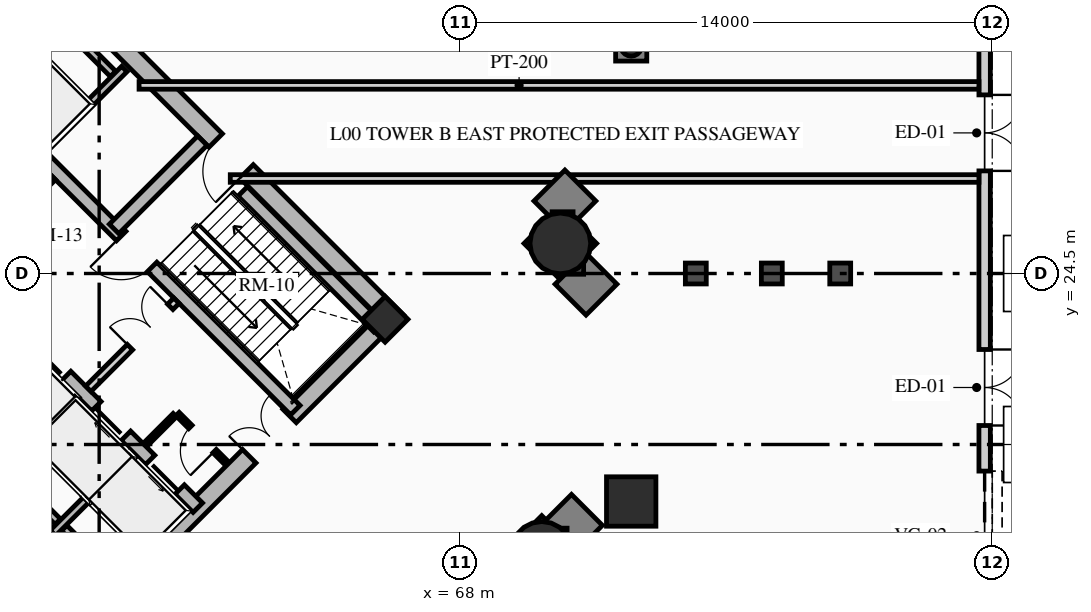
"""IFC4 building model, lengths in metres.
Left out: names, types, materials, properties, quantities, classifications, styles, units other than length and angle.
Written with IfcOpenShell. Run it as: python <this file> out.ifc"""

import sys

from ifc_helpers import new_model, si_unit, direction, frame, frame_2d, origin, origin_2d, place, context, subcontext, project, spatial, rectangle, circle, hollow_circle, extrude, source, transform, mapped, element, fill, save


model = new_model("IFC4")
c1 = context("Model", 3, precision=1e-05, world=origin(), true_north=direction((0.0, 1.0)))
c2 = subcontext(c1, "Body", "Model", "MODEL_VIEW")
j1 = project(units=[si_unit("LENGTHUNIT", "METRE"), si_unit("PLANEANGLEUNIT", "RADIAN")], contexts=[c1])
p1 = place(None, origin())
s1 = spatial("IfcSite", under=j1, at=p1, CompositionType="ELEMENT")
p2 = place(p1, origin())
s2 = spatial("IfcBuilding", under=s1, at=p2, CompositionType="ELEMENT")
p3 = place(p2, origin())
s3 = spatial("IfcBuildingStorey", under=s2, at=p3, CompositionType="ELEMENT", Elevation=0.0)
p4 = place(p3, frame((58.773, 15.661, 0.0), z_axis=(0.0, 0.0, 1.0), x_axis=(-0.707106781187, 0.707106781187, 0.0)))
e1 = element("IfcWall", 1, at=p4, inside=s3, PredefinedType="SHEAR", context=c2, shape_type="SweptSolid", body=[
    extrude(rectangle(XDim=14.3, YDim=0.5, at=frame_2d((7.15, 0.0))), origin(), (0.0, 0.0, 1.0), 4.8),
])
p5 = place(p3, frame((66.339, 23.227, 0.0), z_axis=(0.0, 0.0, 1.0), x_axis=(-0.707106781187, 0.707106781187, 0.0)))
e2 = element("IfcWall", 2, at=p5, inside=s3, PredefinedType="SHEAR", context=c2, shape_type="SweptSolid", body=[
    extrude(rectangle(XDim=14.3, YDim=0.5, at=frame_2d((7.15, 0.0))), origin(), (0.0, 0.0, 1.0), 4.8),
])
m1 = source(origin(), c2, "Body", "SweptSolid", [
    extrude(rectangle(XDim=1.15, YDim=2.02, at=frame_2d((0.575, 1.01))), frame((0.0, 0.26, 0.0), z_axis=(0.0, -1.0, 0.0), x_axis=(1.0, 0.0, 0.0)), (0.0, 0.0, 1.0), 0.52),
])
p6 = place(p5, frame((5.6, 0.0, 0.0)))
e3 = element("IfcOpeningElement", 3, at=p6, cuts=e2, PredefinedType="OPENING", context=c2, shape_type="MappedRepresentation", body=[
    mapped(m1, transform((0.0, 0.0, 0.0), x_axis=(1.0, 0.0, 0.0), y_axis=(0.0, 1.0, 0.0), z_axis=(0.0, 0.0, 1.0), scale=1.0)),
])
p7 = place(p3, frame((58.596, 15.838, 0.0), z_axis=(0.0, 0.0, 1.0), x_axis=(0.707106781187, 0.707106781187, 0.0)))
e4 = element("IfcWall", 4, at=p7, inside=s3, PredefinedType="SHEAR", context=c2, shape_type="SweptSolid", body=[
    extrude(rectangle(XDim=10.7, YDim=0.5, at=frame_2d((5.35, 0.0))), origin(), (0.0, 0.0, 1.0), 4.8),
])
m2 = source(origin(), c2, "Body", "SweptSolid", [
    extrude(rectangle(XDim=1.5, YDim=2.02, at=frame_2d((0.75, 1.01))), frame((0.0, 0.26, 0.0), z_axis=(0.0, -1.0, 0.0), x_axis=(1.0, 0.0, 0.0)), (0.0, 0.0, 1.0), 0.52),
])
p8 = place(p7, frame((5.45, 0.0, 0.0)))
e5 = element("IfcOpeningElement", 5, at=p8, cuts=e4, PredefinedType="OPENING", context=c2, shape_type="MappedRepresentation", body=[
    mapped(m2, transform((0.0, 0.0, 0.0), x_axis=(1.0, 0.0, 0.0), y_axis=(0.0, 1.0, 0.0), z_axis=(0.0, 0.0, 1.0), scale=1.0)),
])
p9 = place(p3, frame((61.096, 18.338, 0.0), z_axis=(0.0, 0.0, 1.0), x_axis=(-0.707106781187, 0.707106781187, 0.0)))
e6 = element("IfcWall", 6, at=p9, inside=s3, PredefinedType="SHEAR", context=c2, shape_type="SweptSolid", body=[
    extrude(rectangle(XDim=13.8, YDim=0.35, at=frame_2d((6.9, 0.0))), origin(), (0.0, 0.0, 1.0), 4.8),
])
m3 = source(origin(), c2, "Body", "SweptSolid", [
    extrude(rectangle(XDim=1.1, YDim=2.015, at=frame_2d((0.55, 1.007))), frame((0.0, 0.185, 0.0), z_axis=(0.0, -1.0, 0.0), x_axis=(1.0, 0.0, 0.0)), (0.0, 0.0, 1.0), 0.37),
])
p10 = place(p9, frame((4.9, 0.0, 0.0)))
e7 = element("IfcOpeningElement", 7, at=p10, cuts=e6, PredefinedType="OPENING", context=c2, shape_type="MappedRepresentation", body=[
    mapped(m3, transform((0.0, 0.0, 0.0), x_axis=(1.0, 0.0, 0.0), y_axis=(0.0, 1.0, 0.0), z_axis=(0.0, 0.0, 1.0), scale=1.0)),
])
p11 = place(p9, frame((0.675, 0.0, 0.0)))
e8 = element("IfcOpeningElement", 8, at=p11, cuts=e6, PredefinedType="OPENING", context=c2, shape_type="MappedRepresentation", body=[
    mapped(m3, transform((0.0, 0.0, 0.0), x_axis=(1.0, 0.0, 0.0), y_axis=(0.0, 1.0, 0.0), z_axis=(0.0, 0.0, 1.0), scale=1.0)),
])
p12 = place(p9, frame((2.675, 0.0, 0.0)))
e9 = element("IfcOpeningElement", 9, at=p12, cuts=e6, PredefinedType="OPENING", context=c2, shape_type="MappedRepresentation", body=[
    mapped(m3, transform((0.0, 0.0, 0.0), x_axis=(1.0, 0.0, 0.0), y_axis=(0.0, 1.0, 0.0), z_axis=(0.0, 0.0, 1.0), scale=1.0)),
])
m4 = source(origin(), c2, "Body", "SweptSolid", [
    extrude(rectangle(XDim=1.15, YDim=2.02, at=frame_2d((0.575, 1.01))), frame((0.0, 0.185, 0.0), z_axis=(0.0, -1.0, 0.0), x_axis=(1.0, 0.0, 0.0)), (0.0, 0.0, 1.0), 0.37),
])
p13 = place(p9, frame((7.32, 0.0, 0.0)))
e10 = element("IfcOpeningElement", 10, at=p13, cuts=e6, PredefinedType="OPENING", context=c2, shape_type="MappedRepresentation", body=[
    mapped(m4, transform((0.0, 0.0, 0.0), x_axis=(1.0, 0.0, 0.0), y_axis=(0.0, 1.0, 0.0), z_axis=(0.0, 0.0, 1.0), scale=1.0)),
])
p14 = place(p3, frame((63.662, 20.904, 0.0), z_axis=(0.0, 0.0, 1.0), x_axis=(-0.707106781187, 0.707106781187, 0.0)))
e11 = element("IfcWall", 11, at=p14, inside=s3, PredefinedType="SHEAR", context=c2, shape_type="SweptSolid", body=[
    extrude(rectangle(XDim=13.8, YDim=0.35, at=frame_2d((6.9, 0.0))), origin(), (0.0, 0.0, 1.0), 4.8),
])
p15 = place(p14, frame((10.025, 0.0, 0.0)))
e12 = element("IfcOpeningElement", 12, at=p15, cuts=e11, PredefinedType="OPENING", context=c2, shape_type="MappedRepresentation", body=[
    mapped(m3, transform((0.0, 0.0, 0.0), x_axis=(1.0, 0.0, 0.0), y_axis=(0.0, 1.0, 0.0), z_axis=(0.0, 0.0, 1.0), scale=1.0)),
])
p16 = place(p14, frame((12.025, 0.0, 0.0)))
e13 = element("IfcOpeningElement", 13, at=p16, cuts=e11, PredefinedType="OPENING", context=c2, shape_type="MappedRepresentation", body=[
    mapped(m3, transform((0.0, 0.0, 0.0), x_axis=(1.0, 0.0, 0.0), y_axis=(0.0, 1.0, 0.0), z_axis=(0.0, 0.0, 1.0), scale=1.0)),
])
p17 = place(p14, frame((5.33, 0.0, 0.0)))
e14 = element("IfcOpeningElement", 14, at=p17, cuts=e11, PredefinedType="OPENING", context=c2, shape_type="MappedRepresentation", body=[
    mapped(m4, transform((0.0, 0.0, 0.0), x_axis=(1.0, 0.0, 0.0), y_axis=(0.0, 1.0, 0.0), z_axis=(0.0, 0.0, 1.0), scale=1.0)),
])
p18 = place(p3, frame((65.847, 23.089, 0.0), z_axis=(0.0, 0.0, 1.0), x_axis=(-0.707106781187, 0.707106781187, 0.0)))
e15 = element("IfcWall", 15, at=p18, inside=s3, PredefinedType="SHEAR", context=c2, shape_type="SweptSolid", body=[
    extrude(rectangle(XDim=5.05, YDim=0.35, at=frame_2d((2.525, 0.0))), origin(), (0.0, 0.0, 1.0), 4.8),
])
p19 = place(p3, frame((58.893, 25.674, 0.0), z_axis=(0.0, 0.0, 1.0), x_axis=(0.707106781187, 0.707106781187, 0.0)))
e16 = element("IfcWall", 16, at=p19, inside=s3, PredefinedType="SHEAR", context=c2, shape_type="SweptSolid", body=[
    extrude(rectangle(XDim=3.285, YDim=0.35, at=frame_2d((1.643, 0.0))), origin(), (0.0, 0.0, 1.0), 4.8),
])
p20 = place(p3, frame((66.024, 23.294, 0.0), z_axis=(0.0, 0.0, 1.0), x_axis=(0.707106781187, 0.707106781187, 0.0)))
e17 = element("IfcColumn", 17, at=p20, inside=s3, PredefinedType="COLUMN", context=c2, shape_type="SweptSolid", body=[
    extrude(rectangle(XDim=0.85, YDim=0.85, at=origin_2d()), origin(), (0.0, 0.0, 1.0), 4.8),
])
for number, where, z_axis, x_axis in (
    (18, (70.146, 17.173, 0.0), (0.0, 0.0, 1.0), (1.0, 0.0, 0.0)),
    (19, (70.635, 25.291, 0.0), (0.0, 0.0, 1.0), (1.0, 0.0, 0.0)),
):
    element("IfcColumn", number, at=place(p3, frame(where, z_axis=z_axis, x_axis=x_axis)), inside=s3, PredefinedType="USERDEFINED", context=c2, shape_type="SweptSolid", body=[
        extrude(circle(Radius=0.8, at=origin_2d()), origin(), (0.0, 0.0, 1.0), 4.8),
    ])
p21 = place(p3, frame((72.5, 18.5, 0.0), z_axis=(0.0, 0.0, 1.0), x_axis=(1.0, 0.0, 0.0)))
e20 = element("IfcColumn", 20, at=p21, inside=s3, PredefinedType="COLUMN", context=c2, shape_type="SweptSolid", body=[
    extrude(rectangle(XDim=1.3, YDim=1.3, at=origin_2d()), origin(), (0.0, 0.0, 1.0), 4.8),
])
p22 = place(p3, frame((72.5, 30.5, 0.0), z_axis=(0.0, 0.0, 1.0), x_axis=(1.0, 0.0, 0.0)))
e21 = element("IfcColumn", 21, at=p22, inside=s3, PredefinedType="COLUMN", context=c2, shape_type="SweptSolid", body=[
    extrude(hollow_circle(Radius=0.28, WallThickness=0.02, at=origin_2d()), origin(), (0.0, 0.0, 1.0), 4.8),
])
p23 = place(p3, frame((81.8, 44.5, 0.0), z_axis=(0.0, 0.0, 1.0), x_axis=(0.0, -1.0, 0.0)))
e22 = element("IfcWall", 22, at=p23, inside=s3, PredefinedType="SOLIDWALL", context=c2, shape_type="SweptSolid", body=[
    extrude(rectangle(XDim=40.0, YDim=0.3, at=frame_2d((20.0, 0.0))), origin(), (0.0, 0.0, 1.0), 4.485),
])
m5 = source(origin(), c2, "Body", "SweptSolid", [
    extrude(rectangle(XDim=6.0, YDim=3.1, at=frame_2d((3.0, 1.55))), frame((0.0, 0.16, 0.0), z_axis=(0.0, -1.0, 0.0), x_axis=(1.0, 0.0, 0.0)), (0.0, 0.0, 1.0), 0.32),
])
p24 = place(p23, frame((33.6, 0.0, 0.0)))
e23 = element("IfcOpeningElement", 23, at=p24, cuts=e22, PredefinedType="OPENING", context=c2, shape_type="MappedRepresentation", body=[
    mapped(m5, transform((0.0, 0.0, 0.0), x_axis=(1.0, 0.0, 0.0), y_axis=(0.0, 1.0, 0.0), z_axis=(0.0, 0.0, 1.0), scale=1.0)),
])
m6 = source(origin(), c2, "Body", "SweptSolid", [
    extrude(rectangle(XDim=3.4, YDim=3.0, at=frame_2d((1.7, 1.5))), frame((0.0, 0.16, 0.0), z_axis=(0.0, -1.0, 0.0), x_axis=(1.0, 0.0, 0.0)), (0.0, 0.0, 1.0), 0.32),
])
p25 = place(p23, frame((25.2, 0.0, 0.0)))
e24 = element("IfcOpeningElement", 24, at=p25, cuts=e22, PredefinedType="OPENING", context=c2, shape_type="MappedRepresentation", body=[
    mapped(m6, transform((0.0, 0.0, 0.0), x_axis=(1.0, 0.0, 0.0), y_axis=(0.0, 1.0, 0.0), z_axis=(0.0, 0.0, 1.0), scale=1.0)),
])
p26 = place(p23, frame((29.2, 0.0, 0.0)))
e25 = element("IfcOpeningElement", 25, at=p26, cuts=e22, PredefinedType="OPENING", context=c2, shape_type="MappedRepresentation", body=[
    mapped(m6, transform((0.0, 0.0, 0.0), x_axis=(1.0, 0.0, 0.0), y_axis=(0.0, 1.0, 0.0), z_axis=(0.0, 0.0, 1.0), scale=1.0)),
])
m7 = source(origin(), c2, "Body", "SweptSolid", [
    extrude(rectangle(XDim=2.0, YDim=2.25, at=frame_2d((1.0, 1.125))), frame((0.0, 0.16, 0.0), z_axis=(0.0, -1.0, 0.0), x_axis=(1.0, 0.0, 0.0)), (0.0, 0.0, 1.0), 0.32),
])
p27 = place(p23, frame((6.0, 0.0, 0.0)))
e26 = element("IfcOpeningElement", 26, at=p27, cuts=e22, PredefinedType="OPENING", context=c2, shape_type="MappedRepresentation", body=[
    mapped(m7, transform((0.0, 0.0, 0.0), x_axis=(1.0, 0.0, 0.0), y_axis=(0.0, 1.0, 0.0), z_axis=(0.0, 0.0, 1.0), scale=1.0)),
])
p28 = place(p23, frame((15.3, 0.0, 0.0)))
e27 = element("IfcOpeningElement", 27, at=p28, cuts=e22, PredefinedType="OPENING", context=c2, shape_type="MappedRepresentation", body=[
    mapped(m7, transform((0.0, 0.0, 0.0), x_axis=(1.0, 0.0, 0.0), y_axis=(0.0, 1.0, 0.0), z_axis=(0.0, 0.0, 1.0), scale=1.0)),
])
p29 = place(p23, frame((22.0, 0.0, 0.0)))
e28 = element("IfcOpeningElement", 28, at=p29, cuts=e22, PredefinedType="OPENING", context=c2, shape_type="MappedRepresentation", body=[
    mapped(m7, transform((0.0, 0.0, 0.0), x_axis=(1.0, 0.0, 0.0), y_axis=(0.0, 1.0, 0.0), z_axis=(0.0, 0.0, 1.0), scale=1.0)),
])
p30 = place(p3, frame((55.888, 19.069, 0.0), z_axis=(0.0, 0.0, 1.0), x_axis=(0.707106781187, 0.707106781187, 0.0)))
e29 = element("IfcWall", 29, at=p30, inside=s3, PredefinedType="SHEAR", context=c2, shape_type="SweptSolid", body=[
    extrude(rectangle(XDim=2.97, YDim=0.2, at=frame_2d((1.485, 0.0))), origin(), (0.0, 0.0, 1.0), 4.8),
])
p31 = place(p3, frame((57.284, 17.673, 0.0), z_axis=(0.0, 0.0, 1.0), x_axis=(0.707147878904, 0.70706568108, 0.0)))
e30 = element("IfcWall", 30, at=p31, inside=s3, PredefinedType="SHEAR", context=c2, shape_type="SweptSolid", body=[
    extrude(rectangle(XDim=2.97, YDim=0.2, at=frame_2d((1.485, 0.0))), origin(), (0.0, 0.0, 1.0), 4.8),
])
p32 = place(p3, frame((57.412, 17.97, 0.0), z_axis=(0.0, 0.0, 1.0), x_axis=(-0.707106781187, 0.707106781187, 0.0)))
e31 = element("IfcWall", 31, at=p32, inside=s3, PredefinedType="SHEAR", context=c2, shape_type="SweptSolid", body=[
    extrude(rectangle(XDim=1.735, YDim=0.2, at=frame_2d((0.867, 0.0))), origin(), (0.0, 0.0, 1.0), 4.8),
])
p33 = place(p3, frame((58.737, 16.644, 0.0), z_axis=(0.0, 0.0, 1.0), x_axis=(-0.707032117043, 0.707181437447, 0.0)))
e32 = element("IfcWall", 32, at=p33, inside=s3, PredefinedType="SHEAR", context=c2, shape_type="SweptSolid", body=[
    extrude(rectangle(XDim=1.635, YDim=0.2, at=frame_2d((0.817, 0.0))), origin(), (0.0, 0.0, 1.0), 4.8),
])
p34 = place(p3, frame((57.062, 27.781, 0.0), z_axis=(0.0, 0.0, 1.0), x_axis=(0.707106781187, 0.707106781187, 0.0)))
e33 = element("IfcWall", 33, at=p34, inside=s3, PredefinedType="SHEAR", context=c2, shape_type="SweptSolid", body=[
    extrude(rectangle(XDim=2.97, YDim=0.2, at=frame_2d((1.485, 0.0))), origin(), (0.0, 0.0, 1.0), 4.8),
])
p35 = place(p3, frame((55.615, 29.227, 0.0), z_axis=(0.0, 0.0, 1.0), x_axis=(0.707147878904, 0.70706568108, 0.0)))
e34 = element("IfcWall", 34, at=p35, inside=s3, PredefinedType="SHEAR", context=c2, shape_type="SweptSolid", body=[
    extrude(rectangle(XDim=2.97, YDim=0.2, at=frame_2d((1.485, 0.0))), origin(), (0.0, 0.0, 1.0), 4.8),
])
p36 = place(p3, frame((58.865, 29.754, 0.0), z_axis=(0.0, 0.0, 1.0), x_axis=(-0.707174411312, 0.707039144592, 0.0)))
e35 = element("IfcWall", 35, at=p36, inside=s3, PredefinedType="SHEAR", context=c2, shape_type="SweptSolid", body=[
    extrude(rectangle(XDim=1.805, YDim=0.2, at=frame_2d((0.902, 0.0))), origin(), (0.0, 0.0, 1.0), 4.8),
])
p37 = place(p3, frame((58.214, 21.467, 0.0), z_axis=(0.0, 0.0, 1.0), x_axis=(0.707106781187, 0.707106781187, 0.0)))
e36 = element("IfcWall", 36, at=p37, inside=s3, PredefinedType="PARTITIONING", context=c2, shape_type="SweptSolid", body=[
    extrude(rectangle(XDim=3.28, YDim=0.2, at=frame_2d((1.64, 0.0))), origin(), (0.0, 0.0, 1.0), 4.485),
])
m8 = source(origin(), c2, "Body", "SweptSolid", [
    extrude(rectangle(XDim=1.5, YDim=2.02, at=frame_2d((0.75, 1.01))), frame((0.0, 0.11, 0.0), z_axis=(0.0, -1.0, 0.0), x_axis=(1.0, 0.0, 0.0)), (0.0, 0.0, 1.0), 0.22),
])
p38 = place(p37, frame((1.55, 0.0, 0.0)))
e37 = element("IfcOpeningElement", 37, at=p38, cuts=e36, PredefinedType="OPENING", context=c2, shape_type="MappedRepresentation", body=[
    mapped(m8, transform((0.0, 0.0, 0.0), x_axis=(1.0, 0.0, 0.0), y_axis=(0.0, 1.0, 0.0), z_axis=(0.0, 0.0, 1.0), scale=1.0)),
])
p39 = place(p3, frame((54.961, 24.719, 0.0), z_axis=(0.0, 0.0, 1.0), x_axis=(0.707106781187, 0.707106781187, 0.0)))
e38 = element("IfcWall", 38, at=p39, inside=s3, PredefinedType="PARTITIONING", context=c2, shape_type="SweptSolid", body=[
    extrude(rectangle(XDim=3.28, YDim=0.2, at=frame_2d((1.64, 0.0))), origin(), (0.0, 0.0, 1.0), 4.485),
])
m9 = source(origin(), c2, "Body", "SweptSolid", [
    extrude(rectangle(XDim=0.9, YDim=2.005, at=frame_2d((0.45, 1.002))), frame((0.0, 0.11, 0.0), z_axis=(0.0, -1.0, 0.0), x_axis=(1.0, 0.0, 0.0)), (0.0, 0.0, 1.0), 0.22),
])
p40 = place(p39, frame((0.16, 0.0, 0.0)))
e39 = element("IfcOpeningElement", 39, at=p40, cuts=e38, PredefinedType="OPENING", context=c2, shape_type="MappedRepresentation", body=[
    mapped(m9, transform((0.0, 0.0, 0.0), x_axis=(1.0, 0.0, 0.0), y_axis=(0.0, 1.0, 0.0), z_axis=(0.0, 0.0, 1.0), scale=1.0)),
])
p41 = place(p3, frame((61.835, 19.529, 0.0), z_axis=(0.0, 0.0, 1.0), x_axis=(-0.707174592913, 0.707038962956, 0.0)))
e40 = element("IfcWall", 40, at=p41, inside=s3, PredefinedType="PARTITIONING", context=c2, shape_type="SweptSolid", body=[
    extrude(rectangle(XDim=1.8, YDim=0.125, at=frame_2d((0.9, 0.0))), origin(), (0.0, 0.0, 1.0), 4.485),
])
m10 = source(origin(), c2, "Body", "SweptSolid", [
    extrude(rectangle(XDim=0.9, YDim=2.005, at=frame_2d((0.45, 1.002))), frame((0.0, 0.073, 0.0), z_axis=(0.0, -1.0, 0.0), x_axis=(1.0, 0.0, 0.0)), (0.0, 0.0, 1.0), 0.145),
])
p42 = place(p41, frame((0.42, 0.0, 0.0)))
e41 = element("IfcOpeningElement", 41, at=p42, cuts=e40, PredefinedType="OPENING", context=c2, shape_type="MappedRepresentation", body=[
    mapped(m10, transform((0.0, 0.0, 0.0), x_axis=(1.0, 0.0, 0.0), y_axis=(0.0, 1.0, 0.0), z_axis=(0.0, 0.0, 1.0), scale=1.0)),
])
p43 = place(p3, frame((59.713, 19.996, 0.0), z_axis=(0.0, 0.0, 1.0), x_axis=(0.707217726, 0.706995818963, 0.0)))
e42 = element("IfcWall", 42, at=p43, inside=s3, PredefinedType="PARTITIONING", context=c2, shape_type="SweptSolid", body=[
    extrude(rectangle(XDim=1.1, YDim=0.125, at=frame_2d((0.55, 0.0))), origin(), (0.0, 0.0, 1.0), 4.485),
])
p44 = place(p3, frame((59.55, 29.45, 0.0), z_axis=(0.0, 0.0, 1.0), x_axis=(1.0, 0.0, 0.0)))
e43 = element("IfcWall", 43, at=p44, inside=s3, PredefinedType="PARTITIONING", context=c2, shape_type="SweptSolid", body=[
    extrude(rectangle(XDim=22.1, YDim=0.2, at=frame_2d((11.05, 0.0))), origin(), (0.0, 0.0, 1.0), 3.529),
])
p45 = place(p3, frame((61.95, 27.0, 0.0), z_axis=(0.0, 0.0, 1.0), x_axis=(1.0, 0.0, 0.0)))
e44 = element("IfcWall", 44, at=p45, inside=s3, PredefinedType="PARTITIONING", context=c2, shape_type="SweptSolid", body=[
    extrude(rectangle(XDim=19.7, YDim=0.2, at=frame_2d((9.85, 0.0))), origin(), (0.0, 0.0, 1.0), 3.529),
])
m11 = source(origin(), c2, "Body", "SweptSolid", [
    extrude(rectangle(XDim=3.4, YDim=3.0, at=frame_2d((1.7, 1.5))), frame((0.0, 0.025, 0.0), z_axis=(0.0, -1.0, 0.0), x_axis=(1.0, 0.0, 0.0)), (0.0, 0.0, 1.0), 0.05),
])
p46 = place(p25, origin())
e45 = element("IfcDoor", 45, at=p46, inside=s3, OperationType="ROLLINGUP", PredefinedType="GATE", context=c2, shape_type="MappedRepresentation", body=[
    mapped(m11, transform((0.0, 0.0, 0.0), x_axis=(1.0, 0.0, 0.0), y_axis=(0.0, 1.0, 0.0), z_axis=(0.0, 0.0, 1.0), scale=1.0)),
])
fill(e24, e45)
m12 = source(origin(), c2, "Body", "SweptSolid", [
    extrude(rectangle(XDim=2.0, YDim=2.25, at=frame_2d((1.0, 1.125))), frame((0.0, 0.025, 0.0), z_axis=(0.0, -1.0, 0.0), x_axis=(1.0, 0.0, 0.0)), (0.0, 0.0, 1.0), 0.05),
])
p47 = place(p28, origin())
e46 = element("IfcDoor", 46, at=p47, inside=s3, OperationType="DOUBLE_DOOR_SINGLE_SWING", PredefinedType="DOOR", context=c2, shape_type="MappedRepresentation", body=[
    mapped(m12, transform((0.0, 0.0, 0.0), x_axis=(1.0, 0.0, 0.0), y_axis=(0.0, 1.0, 0.0), z_axis=(0.0, 0.0, 1.0), scale=1.0)),
])
fill(e27, e46)
p48 = place(p29, origin())
e47 = element("IfcDoor", 47, at=p48, inside=s3, OperationType="DOUBLE_DOOR_SINGLE_SWING", PredefinedType="DOOR", context=c2, shape_type="MappedRepresentation", body=[
    mapped(m12, transform((0.0, 0.0, 0.0), x_axis=(1.0, 0.0, 0.0), y_axis=(0.0, 1.0, 0.0), z_axis=(0.0, 0.0, 1.0), scale=1.0)),
])
fill(e28, e47)
m13 = source(origin(), c2, "Body", "SweptSolid", [
    extrude(rectangle(XDim=1.1, YDim=2.015, at=frame_2d((0.55, 1.007))), frame((0.0, 0.025, 0.0), z_axis=(0.0, -1.0, 0.0), x_axis=(1.0, 0.0, 0.0)), (0.0, 0.0, 1.0), 0.05),
])
p49 = place(p10, origin())
e48 = element("IfcDoor", 48, at=p49, inside=s3, OperationType="SLIDING_TO_RIGHT", PredefinedType="DOOR", context=c2, shape_type="MappedRepresentation", body=[
    mapped(m13, transform((0.0, 0.0, 0.0), x_axis=(1.0, 0.0, 0.0), y_axis=(0.0, 1.0, 0.0), z_axis=(0.0, 0.0, 1.0), scale=1.0)),
])
fill(e7, e48)
p50 = place(p11, origin())
e49 = element("IfcDoor", 49, at=p50, inside=s3, OperationType="SLIDING_TO_LEFT", PredefinedType="DOOR", context=c2, shape_type="MappedRepresentation", body=[
    mapped(m13, transform((0.0, 0.0, 0.0), x_axis=(1.0, 0.0, 0.0), y_axis=(0.0, 1.0, 0.0), z_axis=(0.0, 0.0, 1.0), scale=1.0)),
])
fill(e8, e49)
p51 = place(p12, origin())
e50 = element("IfcDoor", 50, at=p51, inside=s3, OperationType="SLIDING_TO_RIGHT", PredefinedType="DOOR", context=c2, shape_type="MappedRepresentation", body=[
    mapped(m13, transform((0.0, 0.0, 0.0), x_axis=(1.0, 0.0, 0.0), y_axis=(0.0, 1.0, 0.0), z_axis=(0.0, 0.0, 1.0), scale=1.0)),
])
fill(e9, e50)
m14 = source(origin(), c2, "Body", "SweptSolid", [
    extrude(rectangle(XDim=1.15, YDim=2.02, at=frame_2d((0.575, 1.01))), frame((0.0, 0.025, 0.0), z_axis=(0.0, -1.0, 0.0), x_axis=(1.0, 0.0, 0.0)), (0.0, 0.0, 1.0), 0.05),
])
p52 = place(p17, origin())
e51 = element("IfcDoor", 51, at=p52, inside=s3, OperationType="SINGLE_SWING_RIGHT", PredefinedType="DOOR", context=c2, shape_type="MappedRepresentation", body=[
    mapped(m14, transform((0.0, 0.0, 0.0), x_axis=(1.0, 0.0, 0.0), y_axis=(0.0, 1.0, 0.0), z_axis=(0.0, 0.0, 1.0), scale=1.0)),
])
fill(e14, e51)
m15 = source(origin(), c2, "Body", "SweptSolid", [
    extrude(rectangle(XDim=1.5, YDim=2.02, at=frame_2d((0.75, 1.01))), frame((0.0, 0.025, 0.0), z_axis=(0.0, -1.0, 0.0), x_axis=(1.0, 0.0, 0.0)), (0.0, 0.0, 1.0), 0.05),
])
p53 = place(p8, origin())
e52 = element("IfcDoor", 52, at=p53, inside=s3, OperationType="DOUBLE_DOOR_SINGLE_SWING", PredefinedType="DOOR", context=c2, shape_type="MappedRepresentation", body=[
    mapped(m15, transform((0.0, 0.0, 0.0), x_axis=(1.0, 0.0, 0.0), y_axis=(0.0, 1.0, 0.0), z_axis=(0.0, 0.0, 1.0), scale=1.0)),
])
fill(e5, e52)
p54 = place(p38, origin())
e53 = element("IfcDoor", 53, at=p54, inside=s3, OperationType="DOUBLE_DOOR_SINGLE_SWING", PredefinedType="DOOR", context=c2, shape_type="MappedRepresentation", body=[
    mapped(m15, transform((0.0, 0.0, 0.0), x_axis=(1.0, 0.0, 0.0), y_axis=(0.0, 1.0, 0.0), z_axis=(0.0, 0.0, 1.0), scale=1.0)),
])
fill(e37, e53)
m16 = source(origin(), c2, "Body", "SweptSolid", [
    extrude(rectangle(XDim=0.9, YDim=2.005, at=frame_2d((0.45, 1.002))), frame((0.0, 0.025, 0.0), z_axis=(0.0, -1.0, 0.0), x_axis=(1.0, 0.0, 0.0)), (0.0, 0.0, 1.0), 0.05),
])
p55 = place(p42, origin())
e54 = element("IfcDoor", 54, at=p55, inside=s3, OperationType="SINGLE_SWING_LEFT", PredefinedType="DOOR", context=c2, shape_type="MappedRepresentation", body=[
    mapped(m16, transform((0.0, 0.0, 0.0), x_axis=(1.0, 0.0, 0.0), y_axis=(0.0, 1.0, 0.0), z_axis=(0.0, 0.0, 1.0), scale=1.0)),
])
fill(e41, e54)
p56 = place(p6, origin())
e55 = element("IfcDoor", 55, at=p56, inside=s3, OperationType="SINGLE_SWING_LEFT", PredefinedType="DOOR", context=c2, shape_type="MappedRepresentation", body=[
    mapped(m14, transform((0.0, 0.0, 0.0), x_axis=(1.0, 0.0, 0.0), y_axis=(0.0, 1.0, 0.0), z_axis=(0.0, 0.0, 1.0), scale=1.0)),
])
fill(e3, e55)
save(model, sys.argv[1])
